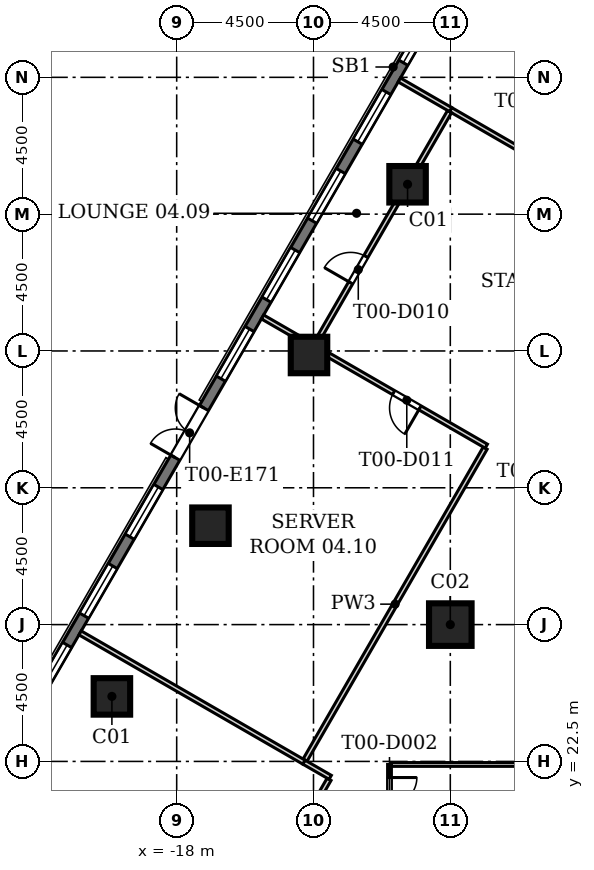
"""IFC4 building model, lengths in metres.
Left out: names, types, materials, properties, quantities, classifications, styles, units other than length and angle.
Written with IfcOpenShell. Run it as: python <this file> out.ifc"""

import sys

from ifc_helpers import new_model, si_unit, direction, frame, frame_2d, origin, origin_2d, place, context, subcontext, project, spatial, rectangle, extrude, element, fill, save


model = new_model("IFC4")
c1 = context("Model", 3, precision=1e-05, world=origin(), true_north=direction((0.0, 1.0)))
c2 = subcontext(c1, "Body", "Model", "MODEL_VIEW")
j1 = project(units=[si_unit("LENGTHUNIT", "METRE"), si_unit("PLANEANGLEUNIT", "RADIAN")], contexts=[c1])
p1 = place(None, origin())
s1 = spatial("IfcSite", under=j1, at=p1, CompositionType="ELEMENT")
p2 = place(p1, origin())
s2 = spatial("IfcBuilding", under=s1, at=p2, CompositionType="ELEMENT")
p3 = place(p2, frame((0.0, 0.0, 25.0)))
s3 = spatial("IfcBuildingStorey", under=s2, at=p3, CompositionType="ELEMENT", Elevation=25.0)
for number, where, z_axis, x_axis in (
    (1, (-10.406, 41.482, 0.0), (0.0, 0.0, 1.0), (1.0, 0.0, 0.0)),
    (2, (-13.648, 35.868, 0.0), (0.0, 0.0, 1.0), (1.0, 0.0, 0.0)),
    (3, (-16.889, 30.253, 0.0), (0.0, 0.0, 1.0), (1.0, 0.0, 0.0)),
    (4, (-20.131, 24.638, 0.0), (0.0, 0.0, 1.0), (1.0, 0.0, 0.0)),
):
    element("IfcColumn", number, at=place(p3, frame(where, z_axis=z_axis, x_axis=x_axis)), inside=s3, PredefinedType="COLUMN", context=c2, shape_type="SweptSolid", body=[
        extrude(rectangle(XDim=1.2, YDim=1.2, at=origin_2d()), origin(), (0.0, 0.0, 1.0), 4.5),
    ])
p4 = place(p3, frame((-9.0, 27.0, 0.0), z_axis=(0.0, 0.0, 1.0), x_axis=(1.0, 0.0, 0.0)))
e5 = element("IfcColumn", 5, at=p4, inside=s3, PredefinedType="COLUMN", context=c2, shape_type="SweptSolid", body=[
    extrude(rectangle(XDim=1.4, YDim=1.4, at=origin_2d()), origin(), (0.0, 0.0, 1.0), 4.5),
])
p5 = place(p3, frame((-4.353, 56.207, 0.0), z_axis=(0.0, 0.0, 1.0), x_axis=(-0.500000836325, -0.866024920931, 0.0)))
e6 = element("IfcWall", 6, at=p5, inside=s3, PredefinedType="SOLIDWALL", context=c2, shape_type="SweptSolid", body=[
    extrude(rectangle(XDim=56.0, YDim=0.34, at=frame_2d((28.0, 0.0))), origin(), (0.0, 0.0, 1.0), 4.2),
])
p6 = place(p5, frame((1.5, 0.0, 0.9)))
e7 = element("IfcOpeningElement", 7, at=p6, cuts=e6, PredefinedType="OPENING", context=c2, shape_type="SweptSolid", body=[
    extrude(rectangle(XDim=1.885, YDim=3.0, at=frame_2d((0.942, 1.5))), frame((0.0, 0.18, 0.0), z_axis=(0.0, -1.0, 0.0), x_axis=(1.0, 0.0, 0.0)), (0.0, 0.0, 1.0), 0.36),
])
p7 = place(p5, frame((4.5, 0.0, 0.9)))
e8 = element("IfcOpeningElement", 8, at=p7, cuts=e6, PredefinedType="OPENING", context=c2, shape_type="SweptSolid", body=[
    extrude(rectangle(XDim=1.885, YDim=3.0, at=frame_2d((0.942, 1.5))), frame((0.0, 0.18, 0.0), z_axis=(0.0, -1.0, 0.0), x_axis=(1.0, 0.0, 0.0)), (0.0, 0.0, 1.0), 0.36),
])
p8 = place(p5, frame((7.5, 0.0, 0.9)))
e9 = element("IfcOpeningElement", 9, at=p8, cuts=e6, PredefinedType="OPENING", context=c2, shape_type="SweptSolid", body=[
    extrude(rectangle(XDim=1.885, YDim=3.0, at=frame_2d((0.942, 1.5))), frame((0.0, 0.18, 0.0), z_axis=(0.0, -1.0, 0.0), x_axis=(1.0, 0.0, 0.0)), (0.0, 0.0, 1.0), 0.36),
])
p9 = place(p5, frame((10.5, 0.0, 0.9)))
e10 = element("IfcOpeningElement", 10, at=p9, cuts=e6, PredefinedType="OPENING", context=c2, shape_type="SweptSolid", body=[
    extrude(rectangle(XDim=1.885, YDim=3.0, at=frame_2d((0.942, 1.5))), frame((0.0, 0.18, 0.0), z_axis=(0.0, -1.0, 0.0), x_axis=(1.0, 0.0, 0.0)), (0.0, 0.0, 1.0), 0.36),
])
p10 = place(p5, frame((13.5, 0.0, 0.9)))
e11 = element("IfcOpeningElement", 11, at=p10, cuts=e6, PredefinedType="OPENING", context=c2, shape_type="SweptSolid", body=[
    extrude(rectangle(XDim=1.885, YDim=3.0, at=frame_2d((0.942, 1.5))), frame((0.0, 0.18, 0.0), z_axis=(0.0, -1.0, 0.0), x_axis=(1.0, 0.0, 0.0)), (0.0, 0.0, 1.0), 0.36),
])
p11 = place(p5, frame((16.5, 0.0, 0.9)))
e12 = element("IfcOpeningElement", 12, at=p11, cuts=e6, PredefinedType="OPENING", context=c2, shape_type="SweptSolid", body=[
    extrude(rectangle(XDim=1.885, YDim=3.0, at=frame_2d((0.942, 1.5))), frame((0.0, 0.18, 0.0), z_axis=(0.0, -1.0, 0.0), x_axis=(1.0, 0.0, 0.0)), (0.0, 0.0, 1.0), 0.36),
])
p12 = place(p5, frame((19.5, 0.0, 0.9)))
e13 = element("IfcOpeningElement", 13, at=p12, cuts=e6, PredefinedType="OPENING", context=c2, shape_type="SweptSolid", body=[
    extrude(rectangle(XDim=1.885, YDim=3.0, at=frame_2d((0.942, 1.5))), frame((0.0, 0.18, 0.0), z_axis=(0.0, -1.0, 0.0), x_axis=(1.0, 0.0, 0.0)), (0.0, 0.0, 1.0), 0.36),
])
p13 = place(p5, frame((22.5, 0.0, 0.9)))
e14 = element("IfcOpeningElement", 14, at=p13, cuts=e6, PredefinedType="OPENING", context=c2, shape_type="SweptSolid", body=[
    extrude(rectangle(XDim=1.885, YDim=3.0, at=frame_2d((0.942, 1.5))), frame((0.0, 0.18, 0.0), z_axis=(0.0, -1.0, 0.0), x_axis=(1.0, 0.0, 0.0)), (0.0, 0.0, 1.0), 0.36),
])
p14 = place(p5, frame((25.5, 0.0, 0.0)))
e15 = element("IfcOpeningElement", 15, at=p14, cuts=e6, PredefinedType="OPENING", context=c2, shape_type="SweptSolid", body=[
    extrude(rectangle(XDim=1.885, YDim=2.6, at=frame_2d((0.942, 1.3))), frame((0.0, 0.18, 0.0), z_axis=(0.0, -1.0, 0.0), x_axis=(1.0, 0.0, 0.0)), (0.0, 0.0, 1.0), 0.36),
])
p15 = place(p5, frame((28.5, 0.0, 0.9)))
e16 = element("IfcOpeningElement", 16, at=p15, cuts=e6, PredefinedType="OPENING", context=c2, shape_type="SweptSolid", body=[
    extrude(rectangle(XDim=1.885, YDim=3.0, at=frame_2d((0.942, 1.5))), frame((0.0, 0.18, 0.0), z_axis=(0.0, -1.0, 0.0), x_axis=(1.0, 0.0, 0.0)), (0.0, 0.0, 1.0), 0.36),
])
p16 = place(p5, frame((31.5, 0.0, 0.9)))
e17 = element("IfcOpeningElement", 17, at=p16, cuts=e6, PredefinedType="OPENING", context=c2, shape_type="SweptSolid", body=[
    extrude(rectangle(XDim=1.885, YDim=3.0, at=frame_2d((0.942, 1.5))), frame((0.0, 0.18, 0.0), z_axis=(0.0, -1.0, 0.0), x_axis=(1.0, 0.0, 0.0)), (0.0, 0.0, 1.0), 0.36),
])
p17 = place(p5, frame((34.5, 0.0, 0.9)))
e18 = element("IfcOpeningElement", 18, at=p17, cuts=e6, PredefinedType="OPENING", context=c2, shape_type="SweptSolid", body=[
    extrude(rectangle(XDim=1.885, YDim=3.0, at=frame_2d((0.942, 1.5))), frame((0.0, 0.18, 0.0), z_axis=(0.0, -1.0, 0.0), x_axis=(1.0, 0.0, 0.0)), (0.0, 0.0, 1.0), 0.36),
])
p18 = place(p5, frame((37.5, 0.0, 0.9)))
e19 = element("IfcOpeningElement", 19, at=p18, cuts=e6, PredefinedType="OPENING", context=c2, shape_type="SweptSolid", body=[
    extrude(rectangle(XDim=1.885, YDim=3.0, at=frame_2d((0.942, 1.5))), frame((0.0, 0.18, 0.0), z_axis=(0.0, -1.0, 0.0), x_axis=(1.0, 0.0, 0.0)), (0.0, 0.0, 1.0), 0.36),
])
p19 = place(p5, frame((40.5, 0.0, 0.9)))
e20 = element("IfcOpeningElement", 20, at=p19, cuts=e6, PredefinedType="OPENING", context=c2, shape_type="SweptSolid", body=[
    extrude(rectangle(XDim=1.885, YDim=3.0, at=frame_2d((0.942, 1.5))), frame((0.0, 0.18, 0.0), z_axis=(0.0, -1.0, 0.0), x_axis=(1.0, 0.0, 0.0)), (0.0, 0.0, 1.0), 0.36),
])
p20 = place(p5, frame((43.5, 0.0, 0.9)))
e21 = element("IfcOpeningElement", 21, at=p20, cuts=e6, PredefinedType="OPENING", context=c2, shape_type="SweptSolid", body=[
    extrude(rectangle(XDim=1.885, YDim=3.0, at=frame_2d((0.942, 1.5))), frame((0.0, 0.18, 0.0), z_axis=(0.0, -1.0, 0.0), x_axis=(1.0, 0.0, 0.0)), (0.0, 0.0, 1.0), 0.36),
])
p21 = place(p5, frame((46.5, 0.0, 0.9)))
e22 = element("IfcOpeningElement", 22, at=p21, cuts=e6, PredefinedType="OPENING", context=c2, shape_type="SweptSolid", body=[
    extrude(rectangle(XDim=1.885, YDim=3.0, at=frame_2d((0.942, 1.5))), frame((0.0, 0.18, 0.0), z_axis=(0.0, -1.0, 0.0), x_axis=(1.0, 0.0, 0.0)), (0.0, 0.0, 1.0), 0.36),
])
p22 = place(p5, frame((49.5, 0.0, 0.9)))
e23 = element("IfcOpeningElement", 23, at=p22, cuts=e6, PredefinedType="OPENING", context=c2, shape_type="SweptSolid", body=[
    extrude(rectangle(XDim=1.885, YDim=3.0, at=frame_2d((0.942, 1.5))), frame((0.0, 0.18, 0.0), z_axis=(0.0, -1.0, 0.0), x_axis=(1.0, 0.0, 0.0)), (0.0, 0.0, 1.0), 0.36),
])
p23 = place(p5, frame((52.5, 0.0, 0.9)))
e24 = element("IfcOpeningElement", 24, at=p23, cuts=e6, PredefinedType="OPENING", context=c2, shape_type="SweptSolid", body=[
    extrude(rectangle(XDim=1.885, YDim=3.0, at=frame_2d((0.942, 1.5))), frame((0.0, 0.18, 0.0), z_axis=(0.0, -1.0, 0.0), x_axis=(1.0, 0.0, 0.0)), (0.0, 0.0, 1.0), 0.36),
])
p24 = place(p3, frame((-11.0, 19.74, 0.0), z_axis=(0.0, 0.0, 1.0), x_axis=(0.0, 1.0, 0.0)))
e25 = element("IfcWall", 25, at=p24, inside=s3, PredefinedType="PARTITIONING", context=c2, shape_type="SweptSolid", body=[
    extrude(rectangle(XDim=2.66, YDim=0.125, at=frame_2d((1.33, 0.0))), origin(), (0.0, 0.0, 1.0), 4.2),
])
p25 = place(p24, frame((0.43, 0.0, 0.0)))
e26 = element("IfcOpeningElement", 26, at=p25, cuts=e25, PredefinedType="OPENING", context=c2, shape_type="SweptSolid", body=[
    extrude(rectangle(XDim=1.8, YDim=2.1, at=frame_2d((0.9, 1.05))), frame((0.0, 0.073, 0.0), z_axis=(0.0, -1.0, 0.0), x_axis=(1.0, 0.0, 0.0)), (0.0, 0.0, 1.0), 0.145),
])
p26 = place(p3, frame((-10.938, 22.4, 0.0), z_axis=(0.0, 0.0, 1.0), x_axis=(1.0, 0.0, 0.0)))
e27 = element("IfcWall", 27, at=p26, inside=s3, PredefinedType="PARTITIONING", context=c2, shape_type="SweptSolid", body=[
    extrude(rectangle(XDim=19.538, YDim=0.125, at=frame_2d((9.769, 0.0))), origin(), (0.0, 0.0, 1.0), 4.2),
])
p27 = place(p26, frame((8.869, 0.0, 0.0)))
e28 = element("IfcOpeningElement", 28, at=p27, cuts=e27, PredefinedType="OPENING", context=c2, shape_type="SweptSolid", body=[
    extrude(rectangle(XDim=1.8, YDim=2.1, at=frame_2d((0.9, 1.05))), frame((0.0, 0.073, 0.0), z_axis=(0.0, -1.0, 0.0), x_axis=(1.0, 0.0, 0.0)), (0.0, 0.0, 1.0), 0.145),
])
p28 = place(p3, frame((-8.988, 43.938, 0.0), z_axis=(0.0, 0.0, 1.0), x_axis=(0.866037534292, -0.499978988757, 0.0)))
e29 = element("IfcWall", 29, at=p28, inside=s3, PredefinedType="PARTITIONING", context=c2, shape_type="SweptSolid", body=[
    extrude(rectangle(XDim=6.975, YDim=0.15, at=frame_2d((3.487, 0.0))), origin(), (0.0, 0.0, 1.0), 4.2),
])
p29 = place(p28, frame((2.988, 0.0, 0.0)))
e30 = element("IfcOpeningElement", 30, at=p29, cuts=e29, PredefinedType="OPENING", context=c2, shape_type="SweptSolid", body=[
    extrude(rectangle(XDim=1.0, YDim=2.1, at=frame_2d((0.5, 1.05))), frame((0.0, 0.085, 0.0), z_axis=(0.0, -1.0, 0.0), x_axis=(1.0, 0.0, 0.0)), (0.0, 0.0, 1.0), 0.17),
])
p30 = place(p3, frame((-13.301, 36.468, 0.0), z_axis=(0.0, 0.0, 1.0), x_axis=(0.499991921166, 0.866030068051, 0.0)))
e31 = element("IfcWall", 31, at=p30, inside=s3, PredefinedType="PARTITIONING", context=c2, shape_type="SweptSolid", body=[
    extrude(rectangle(XDim=5.098, YDim=0.15, at=frame_2d((2.549, 0.0))), origin(), (0.0, 0.0, 1.0), 3.4),
])
p31 = place(p30, frame((2.049, 0.0, 0.0)))
e32 = element("IfcOpeningElement", 32, at=p31, cuts=e31, PredefinedType="OPENING", context=c2, shape_type="SweptSolid", body=[
    extrude(rectangle(XDim=1.0, YDim=2.1, at=frame_2d((0.5, 1.05))), frame((0.0, 0.085, 0.0), z_axis=(0.0, -1.0, 0.0), x_axis=(1.0, 0.0, 0.0)), (0.0, 0.0, 1.0), 0.17),
])
p32 = place(p3, frame((-10.06, 42.082, 0.0), z_axis=(0.0, 0.0, 1.0), x_axis=(0.500012022864, 0.866018462269, 0.0)))
e33 = element("IfcWall", 33, at=p32, inside=s3, PredefinedType="PARTITIONING", context=c2, shape_type="SweptSolid", body=[
    extrude(rectangle(XDim=2.068, YDim=0.15, at=frame_2d((1.034, 0.0))), origin(), (0.0, 0.0, 1.0), 3.4),
])
p33 = place(p3, frame((-13.778, 22.542, 0.0), z_axis=(0.0, 0.0, 1.0), x_axis=(0.500001258315, 0.866024677295, 0.0)))
e34 = element("IfcWall", 34, at=p33, inside=s3, PredefinedType="PARTITIONING", context=c2, shape_type="SweptSolid", body=[
    extrude(rectangle(XDim=11.85, YDim=0.15, at=frame_2d((5.925, 0.0))), origin(), (0.0, 0.0, 1.0), 4.2),
])
p34 = place(p3, frame((-7.816, 32.869, 0.0), z_axis=(0.0, 0.0, 1.0), x_axis=(-0.866018688909, 0.500011630325, 0.0)))
e35 = element("IfcWall", 35, at=p34, inside=s3, PredefinedType="PARTITIONING", context=c2, shape_type="SweptSolid", body=[
    extrude(rectangle(XDim=6.041, YDim=0.15, at=frame_2d((3.021, 0.0))), origin(), (0.0, 0.0, 1.0), 4.2),
])
p35 = place(p34, frame((2.521, 0.0, 0.0)))
e36 = element("IfcOpeningElement", 36, at=p35, cuts=e35, PredefinedType="OPENING", context=c2, shape_type="SweptSolid", body=[
    extrude(rectangle(XDim=1.0, YDim=2.1, at=frame_2d((0.5, 1.05))), frame((0.0, 0.085, 0.0), z_axis=(0.0, -1.0, 0.0), x_axis=(1.0, 0.0, 0.0)), (0.0, 0.0, 1.0), 0.17),
])
p36 = place(p3, frame((-18.912, 11.649, 0.0), z_axis=(0.0, 0.0, 1.0), x_axis=(0.500010179592, 0.866019526514, 0.0)))
e37 = element("IfcWall", 37, at=p36, inside=s3, PredefinedType="PARTITIONING", context=c2, shape_type="SweptSolid", body=[
    extrude(rectangle(XDim=11.85, YDim=0.15, at=frame_2d((5.925, 0.0))), origin(), (0.0, 0.0, 1.0), 4.2),
])
p37 = place(p36, frame((5.425, 0.0, 0.0)))
e38 = element("IfcOpeningElement", 38, at=p37, cuts=e37, PredefinedType="OPENING", context=c2, shape_type="SweptSolid", body=[
    extrude(rectangle(XDim=1.0, YDim=2.1, at=frame_2d((0.5, 1.05))), frame((0.0, 0.085, 0.0), z_axis=(0.0, -1.0, 0.0), x_axis=(1.0, 0.0, 0.0)), (0.0, 0.0, 1.0), 0.17),
])
p38 = place(p3, frame((-12.95, 21.977, 0.0), z_axis=(0.0, 0.0, 1.0), x_axis=(-0.866010750942, 0.50002537861, 0.0)))
e39 = element("IfcWall", 39, at=p38, inside=s3, PredefinedType="PARTITIONING", context=c2, shape_type="SweptSolid", body=[
    extrude(rectangle(XDim=1.0, YDim=0.15, at=frame_2d((0.5, 0.0))), origin(), (0.0, 0.0, 1.0), 4.2),
])
p39 = place(p3, frame((-8.988, 43.938, 0.0), z_axis=(0.0, 0.0, 1.0), x_axis=(-0.866000020948, 0.500043961785, 0.0)))
e40 = element("IfcWall", 40, at=p39, inside=s3, PredefinedType="PARTITIONING", context=c2, shape_type="SweptSolid", body=[
    extrude(rectangle(XDim=1.95, YDim=0.15, at=frame_2d((0.975, 0.0))), origin(), (0.0, 0.0, 1.0), 4.2),
])
p40 = place(p3, frame((-14.049, 36.468, 0.0), z_axis=(0.0, 0.0, 1.0), x_axis=(-0.865973311606, 0.500090215447, 0.0)))
e41 = element("IfcWall", 41, at=p40, inside=s3, PredefinedType="PARTITIONING", context=c2, shape_type="SweptSolid", body=[
    extrude(rectangle(XDim=1.302, YDim=0.15, at=frame_2d((0.651, 0.0))), origin(), (0.0, 0.0, 1.0), 4.2),
])
p41 = place(p3, frame((-13.816, 22.477, 0.0), z_axis=(0.0, 0.0, 1.0), x_axis=(-0.866021522889, 0.500006721848, 0.0)))
e42 = element("IfcWall", 42, at=p41, inside=s3, PredefinedType="PARTITIONING", context=c2, shape_type="SweptSolid", body=[
    extrude(rectangle(XDim=8.5, YDim=0.15, at=frame_2d((4.25, 0.0))), origin(), (0.0, 0.0, 1.0), 4.2),
])
p42 = place(p9, origin())
e43 = element("IfcWindow", 43, at=p42, inside=s3, PartitioningType="SINGLE_PANEL", PredefinedType="WINDOW", context=c2, shape_type="SweptSolid", body=[
    extrude(rectangle(XDim=1.885, YDim=3.0, at=frame_2d((0.942, 1.5))), frame((0.0, 0.11, 0.0), z_axis=(0.0, -1.0, 0.0), x_axis=(1.0, 0.0, 0.0)), (0.0, 0.0, 1.0), 0.06),
])
fill(e10, e43)
p43 = place(p10, origin())
e44 = element("IfcWindow", 44, at=p43, inside=s3, PartitioningType="SINGLE_PANEL", PredefinedType="WINDOW", context=c2, shape_type="SweptSolid", body=[
    extrude(rectangle(XDim=1.885, YDim=3.0, at=frame_2d((0.942, 1.5))), frame((0.0, 0.11, 0.0), z_axis=(0.0, -1.0, 0.0), x_axis=(1.0, 0.0, 0.0)), (0.0, 0.0, 1.0), 0.06),
])
fill(e11, e44)
p44 = place(p11, origin())
e45 = element("IfcWindow", 45, at=p44, inside=s3, PartitioningType="SINGLE_PANEL", PredefinedType="WINDOW", context=c2, shape_type="SweptSolid", body=[
    extrude(rectangle(XDim=1.885, YDim=3.0, at=frame_2d((0.942, 1.5))), frame((0.0, 0.11, 0.0), z_axis=(0.0, -1.0, 0.0), x_axis=(1.0, 0.0, 0.0)), (0.0, 0.0, 1.0), 0.06),
])
fill(e12, e45)
p45 = place(p12, origin())
e46 = element("IfcWindow", 46, at=p45, inside=s3, PartitioningType="SINGLE_PANEL", PredefinedType="WINDOW", context=c2, shape_type="SweptSolid", body=[
    extrude(rectangle(XDim=1.885, YDim=3.0, at=frame_2d((0.942, 1.5))), frame((0.0, 0.11, 0.0), z_axis=(0.0, -1.0, 0.0), x_axis=(1.0, 0.0, 0.0)), (0.0, 0.0, 1.0), 0.06),
])
fill(e13, e46)
p46 = place(p13, origin())
e47 = element("IfcWindow", 47, at=p46, inside=s3, PartitioningType="SINGLE_PANEL", PredefinedType="WINDOW", context=c2, shape_type="SweptSolid", body=[
    extrude(rectangle(XDim=1.885, YDim=3.0, at=frame_2d((0.942, 1.5))), frame((0.0, 0.11, 0.0), z_axis=(0.0, -1.0, 0.0), x_axis=(1.0, 0.0, 0.0)), (0.0, 0.0, 1.0), 0.06),
])
fill(e14, e47)
p47 = place(p14, frame((1.885, 0.0, 0.0), z_axis=(0.0, 0.0, 1.0), x_axis=(-1.0, 0.0, 0.0)))
e48 = element("IfcDoor", 48, at=p47, inside=s3, OperationType="DOUBLE_DOOR_SINGLE_SWING", PredefinedType="DOOR", context=c2, shape_type="SweptSolid", body=[
    extrude(rectangle(XDim=1.885, YDim=2.6, at=frame_2d((0.942, 1.3))), frame((0.0, 0.025, 0.0), z_axis=(0.0, -1.0, 0.0), x_axis=(1.0, 0.0, 0.0)), (0.0, 0.0, 1.0), 0.05),
])
fill(e15, e48)
p48 = place(p15, origin())
e49 = element("IfcWindow", 49, at=p48, inside=s3, PartitioningType="SINGLE_PANEL", PredefinedType="WINDOW", context=c2, shape_type="SweptSolid", body=[
    extrude(rectangle(XDim=1.885, YDim=3.0, at=frame_2d((0.942, 1.5))), frame((0.0, 0.11, 0.0), z_axis=(0.0, -1.0, 0.0), x_axis=(1.0, 0.0, 0.0)), (0.0, 0.0, 1.0), 0.06),
])
fill(e16, e49)
p49 = place(p16, origin())
e50 = element("IfcWindow", 50, at=p49, inside=s3, PartitioningType="SINGLE_PANEL", PredefinedType="WINDOW", context=c2, shape_type="SweptSolid", body=[
    extrude(rectangle(XDim=1.885, YDim=3.0, at=frame_2d((0.942, 1.5))), frame((0.0, 0.11, 0.0), z_axis=(0.0, -1.0, 0.0), x_axis=(1.0, 0.0, 0.0)), (0.0, 0.0, 1.0), 0.06),
])
fill(e17, e50)
p50 = place(p17, origin())
e51 = element("IfcWindow", 51, at=p50, inside=s3, PartitioningType="SINGLE_PANEL", PredefinedType="WINDOW", context=c2, shape_type="SweptSolid", body=[
    extrude(rectangle(XDim=1.885, YDim=3.0, at=frame_2d((0.942, 1.5))), frame((0.0, 0.11, 0.0), z_axis=(0.0, -1.0, 0.0), x_axis=(1.0, 0.0, 0.0)), (0.0, 0.0, 1.0), 0.06),
])
fill(e18, e51)
p51 = place(p25, frame((1.8, 0.0, 0.0), z_axis=(0.0, 0.0, 1.0), x_axis=(-1.0, 0.0, 0.0)))
e52 = element("IfcDoor", 52, at=p51, inside=s3, OperationType="DOUBLE_DOOR_SINGLE_SWING", PredefinedType="DOOR", context=c2, shape_type="SweptSolid", body=[
    extrude(rectangle(XDim=1.8, YDim=2.1, at=frame_2d((0.9, 1.05))), frame((0.0, 0.025, 0.0), z_axis=(0.0, -1.0, 0.0), x_axis=(1.0, 0.0, 0.0)), (0.0, 0.0, 1.0), 0.05),
])
fill(e26, e52)
p52 = place(p31, origin())
e53 = element("IfcDoor", 53, at=p52, inside=s3, OperationType="SINGLE_SWING_LEFT", PredefinedType="DOOR", context=c2, shape_type="SweptSolid", body=[
    extrude(rectangle(XDim=1.0, YDim=2.1, at=frame_2d((0.5, 1.05))), frame((0.0, 0.025, 0.0), z_axis=(0.0, -1.0, 0.0), x_axis=(1.0, 0.0, 0.0)), (0.0, 0.0, 1.0), 0.05),
])
fill(e32, e53)
p53 = place(p35, origin())
e54 = element("IfcDoor", 54, at=p53, inside=s3, OperationType="SINGLE_SWING_LEFT", PredefinedType="DOOR", context=c2, shape_type="SweptSolid", body=[
    extrude(rectangle(XDim=1.0, YDim=2.1, at=frame_2d((0.5, 1.05))), frame((0.0, 0.025, 0.0), z_axis=(0.0, -1.0, 0.0), x_axis=(1.0, 0.0, 0.0)), (0.0, 0.0, 1.0), 0.05),
])
fill(e36, e54)
save(model, sys.argv[1])
